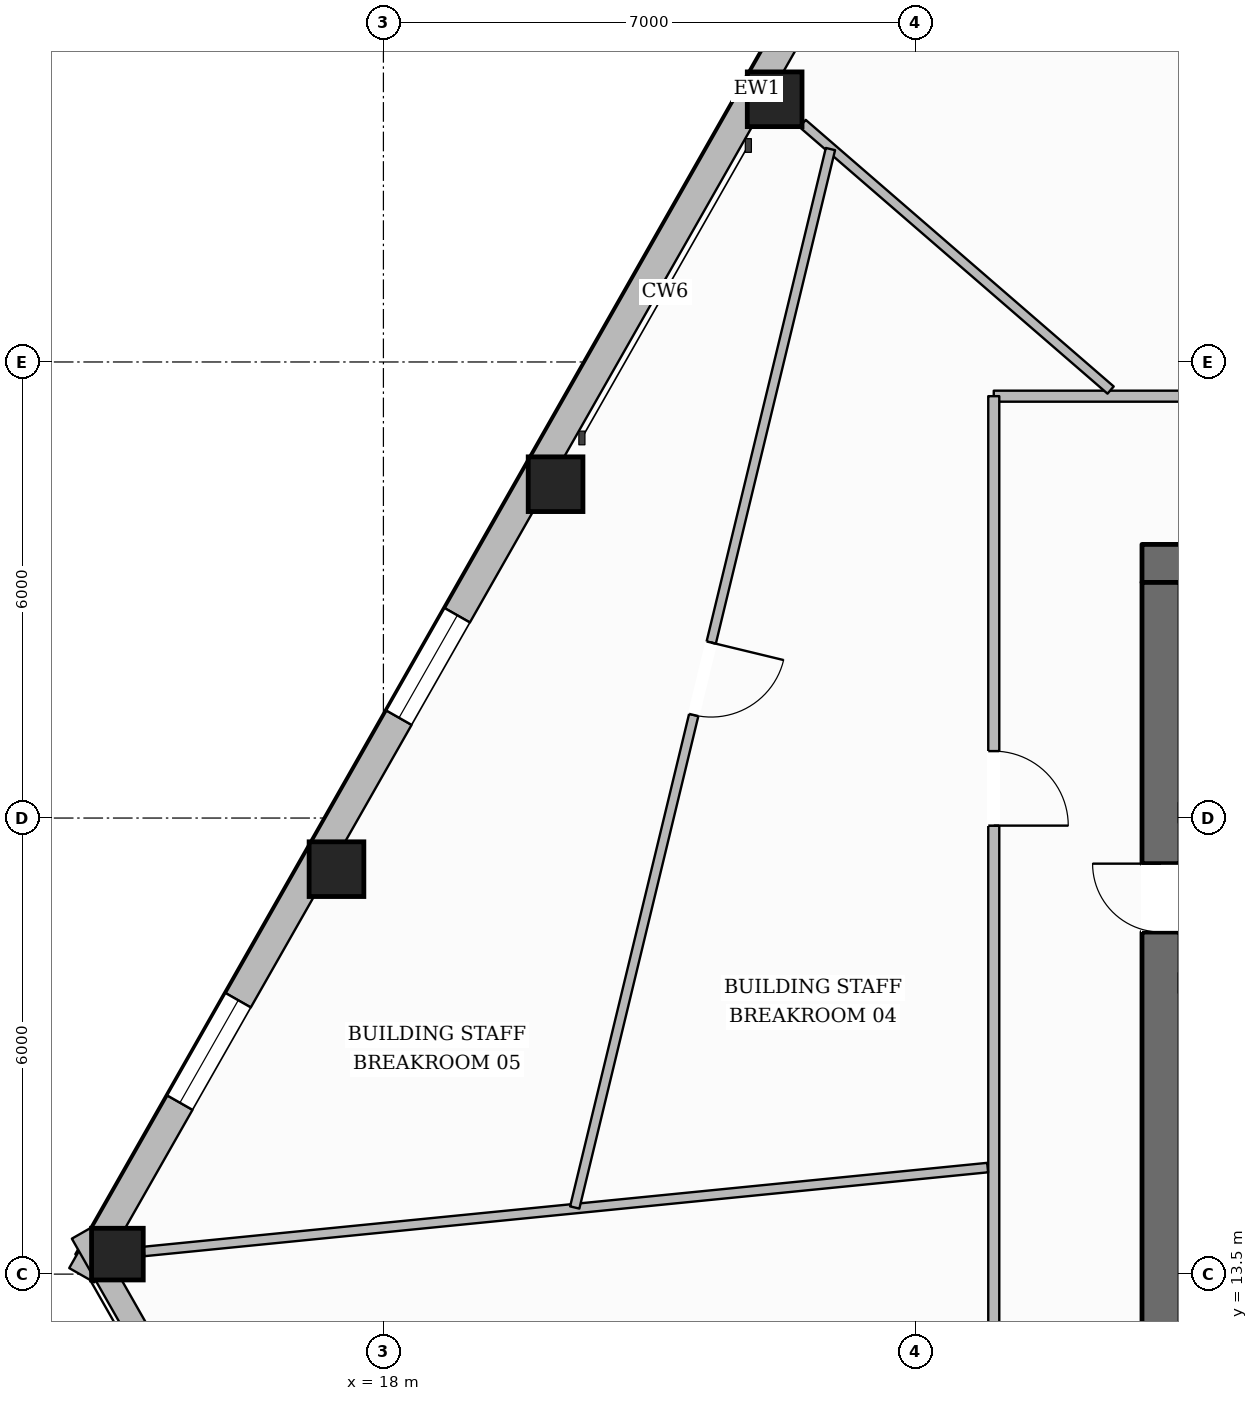
"""IFC4 building model, lengths in metres.
Left out: names, types, materials, properties, quantities, classifications, styles, units other than length and angle.
Written with IfcOpenShell. Run it as: python <this file> out.ifc"""

import sys

from ifc_helpers import new_model, si_unit, direction, frame, frame_2d, origin, origin_2d, place, context, subcontext, project, spatial, rectangle, hollow_rectangle, extrude, element, fill, save


model = new_model("IFC4")
c1 = context("Model", 3, precision=1e-05, world=origin(), true_north=direction((0.0, 1.0)))
c2 = subcontext(c1, "Body", "Model", "MODEL_VIEW")
j1 = project(units=[si_unit("LENGTHUNIT", "METRE"), si_unit("PLANEANGLEUNIT", "RADIAN")], contexts=[c1])
p1 = place(None, origin())
s1 = spatial("IfcSite", under=j1, at=p1, CompositionType="ELEMENT")
p2 = place(p1, origin())
s2 = spatial("IfcBuilding", under=s1, at=p2, CompositionType="ELEMENT")
p3 = place(p2, frame((0.0, 0.0, 93.2)))
s3 = spatial("IfcBuildingStorey", under=s2, at=p3, CompositionType="ELEMENT", Elevation=93.2)
p4 = place(p3, frame((27.98, 22.85, 0.0), z_axis=(0.0, 0.0, 1.0), x_axis=(1.0, 0.0, 0.0)))
e1 = element("IfcWall", 1, at=p4, inside=s3, PredefinedType="SOLIDWALL", context=c2, shape_type="SweptSolid", body=[
    extrude(rectangle(XDim=20.04, YDim=0.5, at=frame_2d((10.02, 0.0))), origin(), (0.0, 0.0, 1.0), 3.6),
])
p5 = place(p4, frame((6.295, 0.0, 0.0)))
e2 = element("IfcOpeningElement", 2, at=p5, cuts=e1, PredefinedType="OPENING", context=c2, shape_type="SweptSolid", body=[
    extrude(rectangle(XDim=1.05, YDim=2.15, at=frame_2d((0.525, 1.075))), frame((0.0, 0.26, 0.0), z_axis=(0.0, -1.0, 0.0), x_axis=(1.0, 0.0, 0.0)), (0.0, 0.0, 1.0), 0.52),
])
p6 = place(p4, frame((12.695, 0.0, 0.0)))
e3 = element("IfcOpeningElement", 3, at=p6, cuts=e1, PredefinedType="OPENING", context=c2, shape_type="SweptSolid", body=[
    extrude(rectangle(XDim=1.05, YDim=2.15, at=frame_2d((0.525, 1.075))), frame((0.0, 0.26, 0.0), z_axis=(0.0, -1.0, 0.0), x_axis=(1.0, 0.0, 0.0)), (0.0, 0.0, 1.0), 0.52),
])
p7 = place(p3, frame((28.23, 9.6, 0.0), z_axis=(0.0, 0.0, 1.0), x_axis=(0.0, 1.0, 0.0)))
e4 = element("IfcWall", 4, at=p7, inside=s3, PredefinedType="SOLIDWALL", context=c2, shape_type="SweptSolid", body=[
    extrude(rectangle(XDim=13.0, YDim=0.5, at=frame_2d((6.5, 0.0))), origin(), (0.0, 0.0, 1.0), 3.6),
])
p8 = place(p7, frame((0.2, 0.0, 0.0)))
e5 = element("IfcOpeningElement", 5, at=p8, cuts=e4, PredefinedType="OPENING", context=c2, shape_type="SweptSolid", body=[
    extrude(rectangle(XDim=1.1, YDim=2.15, at=frame_2d((0.55, 1.075))), frame((0.0, 0.26, 0.0), z_axis=(0.0, -1.0, 0.0), x_axis=(1.0, 0.0, 0.0)), (0.0, 0.0, 1.0), 0.52),
])
p9 = place(p7, frame((8.4, 0.0, 0.0)))
e6 = element("IfcOpeningElement", 6, at=p9, cuts=e4, PredefinedType="OPENING", context=c2, shape_type="SweptSolid", body=[
    extrude(rectangle(XDim=0.9, YDim=2.1, at=frame_2d((0.45, 1.05))), frame((0.0, 0.26, 0.0), z_axis=(0.0, -1.0, 0.0), x_axis=(1.0, 0.0, 0.0)), (0.0, 0.0, 1.0), 0.52),
])
for number, where, z_axis, x_axis in (
    (7, (23.147, 28.956, 0.0), (0.0, 0.0, 1.0), (1.0, 0.0, 0.0)),
    (8, (20.265, 23.892, 0.0), (0.0, 0.0, 1.0), (1.0, 0.0, 0.0)),
    (9, (17.383, 18.827, 0.0), (0.0, 0.0, 1.0), (1.0, 0.0, 0.0)),
):
    element("IfcColumn", number, at=place(p3, frame(where, z_axis=z_axis, x_axis=x_axis)), inside=s3, PredefinedType="COLUMN", context=c2, shape_type="SweptSolid", body=[
        extrude(hollow_rectangle(XDim=0.72, YDim=0.72, WallThickness=0.032, at=origin_2d()), origin(), (0.0, 0.0, 1.0), 3.6),
    ])
p10 = place(p3, frame((14.5, 13.763, 0.0), z_axis=(0.0, 0.0, 1.0), x_axis=(1.0, 0.0, 0.0)))
e10 = element("IfcColumn", 10, at=p10, inside=s3, PredefinedType="COLUMN", context=c2, shape_type="SweptSolid", body=[
    extrude(hollow_rectangle(XDim=0.68, YDim=0.68, WallThickness=0.03, at=origin_2d()), origin(), (0.0, 0.0, 1.0), 3.6),
])
p11 = place(p3, frame((14.031, 13.485, 0.0), z_axis=(0.0, 0.0, 1.0), x_axis=(0.494642620698, 0.869096472084, 0.0)))
e11 = element("IfcWall", 11, at=p11, inside=s3, PredefinedType="STANDARD", context=c2, shape_type="SweptSolid", body=[
    extrude(rectangle(XDim=35.916, YDim=0.38, at=frame_2d((17.958, 0.0))), origin(), (0.0, 0.0, 1.0), 3.059),
])
p12 = place(p11, frame((31.748, 0.0, 0.65)))
e12 = element("IfcOpeningElement", 12, at=p12, cuts=e11, PredefinedType="OPENING", context=c2, shape_type="SweptSolid", body=[
    extrude(rectangle(XDim=1.55, YDim=1.75, at=frame_2d((0.775, 0.875))), frame((0.0, 0.2, 0.0), z_axis=(0.0, -1.0, 0.0), x_axis=(1.0, 0.0, 0.0)), (0.0, 0.0, 1.0), 0.4),
])
p13 = place(p11, frame((25.921, 0.0, 0.65)))
e13 = element("IfcOpeningElement", 13, at=p13, cuts=e11, PredefinedType="OPENING", context=c2, shape_type="SweptSolid", body=[
    extrude(rectangle(XDim=1.55, YDim=1.75, at=frame_2d((0.775, 0.875))), frame((0.0, 0.2, 0.0), z_axis=(0.0, -1.0, 0.0), x_axis=(1.0, 0.0, 0.0)), (0.0, 0.0, 1.0), 0.4),
])
p14 = place(p11, frame((8.439, 0.0, 0.65)))
e14 = element("IfcOpeningElement", 14, at=p14, cuts=e11, PredefinedType="OPENING", context=c2, shape_type="SweptSolid", body=[
    extrude(rectangle(XDim=1.55, YDim=1.75, at=frame_2d((0.775, 0.875))), frame((0.0, 0.2, 0.0), z_axis=(0.0, -1.0, 0.0), x_axis=(1.0, 0.0, 0.0)), (0.0, 0.0, 1.0), 0.4),
])
p15 = place(p11, frame((2.612, 0.0, 0.65)))
e15 = element("IfcOpeningElement", 15, at=p15, cuts=e11, PredefinedType="OPENING", context=c2, shape_type="SweptSolid", body=[
    extrude(rectangle(XDim=1.55, YDim=1.75, at=frame_2d((0.775, 0.875))), frame((0.0, 0.2, 0.0), z_axis=(0.0, -1.0, 0.0), x_axis=(1.0, 0.0, 0.0)), (0.0, 0.0, 1.0), 0.4),
])
p16 = place(p3, frame((20.714, 2.3, 0.0), z_axis=(0.0, 0.0, 1.0), x_axis=(-0.494645467688, 0.869094851726, 0.0)))
e16 = element("IfcWall", 16, at=p16, inside=s3, PredefinedType="STANDARD", context=c2, shape_type="SweptSolid", body=[
    extrude(rectangle(XDim=13.51, YDim=0.3, at=frame_2d((6.755, 0.0))), origin(), (0.0, 0.0, 1.0), 3.059),
])
p17 = place(p16, frame((6.155, 0.0, 0.65)))
e17 = element("IfcOpeningElement", 17, at=p17, cuts=e16, PredefinedType="OPENING", context=c2, shape_type="SweptSolid", body=[
    extrude(rectangle(XDim=1.2, YDim=1.7, at=frame_2d((0.6, 0.85))), frame((0.0, 0.16, 0.0), z_axis=(0.0, -1.0, 0.0), x_axis=(1.0, 0.0, 0.0)), (0.0, 0.0, 1.0), 0.32),
])
p18 = place(p3, frame((49.97, 25.05, 0.0), z_axis=(0.0, 0.0, 1.0), x_axis=(-1.0, 0.0, 0.0)))
e18 = element("IfcWall", 18, at=p18, inside=s3, PredefinedType="PARTITIONING", context=c2, shape_type="SweptSolid", body=[
    extrude(rectangle(XDim=23.94, YDim=0.145, at=frame_2d((11.97, 0.0))), origin(), (0.0, 0.0, 1.0), 3.6),
])
p19 = place(p18, frame((14.53, 0.0, 0.0)))
e19 = element("IfcOpeningElement", 19, at=p19, cuts=e18, PredefinedType="OPENING", context=c2, shape_type="SweptSolid", body=[
    extrude(rectangle(XDim=0.88, YDim=2.1, at=frame_2d((0.44, 1.05))), frame((0.0, 0.083, 0.0), z_axis=(0.0, -1.0, 0.0), x_axis=(1.0, 0.0, 0.0)), (0.0, 0.0, 1.0), 0.165),
])
p20 = place(p18, frame((12.01, 0.0, 0.0)))
e20 = element("IfcOpeningElement", 20, at=p20, cuts=e18, PredefinedType="OPENING", context=c2, shape_type="SweptSolid", body=[
    extrude(rectangle(XDim=0.88, YDim=2.1, at=frame_2d((0.44, 1.05))), frame((0.0, 0.083, 0.0), z_axis=(0.0, -1.0, 0.0), x_axis=(1.0, 0.0, 0.0)), (0.0, 0.0, 1.0), 0.165),
])
p21 = place(p18, frame((9.55, 0.0, 0.0)))
e21 = element("IfcOpeningElement", 21, at=p21, cuts=e18, PredefinedType="OPENING", context=c2, shape_type="SweptSolid", body=[
    extrude(rectangle(XDim=0.96, YDim=2.1, at=frame_2d((0.48, 1.05))), frame((0.0, 0.083, 0.0), z_axis=(0.0, -1.0, 0.0), x_axis=(1.0, 0.0, 0.0)), (0.0, 0.0, 1.0), 0.165),
])
p22 = place(p18, frame((18.561, 0.0, 0.0)))
e22 = element("IfcOpeningElement", 22, at=p22, cuts=e18, PredefinedType="OPENING", context=c2, shape_type="SweptSolid", body=[
    extrude(rectangle(XDim=1.4, YDim=2.2, at=frame_2d((0.7, 1.1))), frame((0.0, 0.083, 0.0), z_axis=(0.0, -1.0, 0.0), x_axis=(1.0, 0.0, 0.0)), (0.0, 0.0, 1.0), 0.165),
])
p23 = place(p3, frame((26.03, 25.05, 0.0), z_axis=(0.0, 0.0, 1.0), x_axis=(0.0, -1.0, 0.0)))
e23 = element("IfcWall", 23, at=p23, inside=s3, PredefinedType="PARTITIONING", context=c2, shape_type="SweptSolid", body=[
    extrude(rectangle(XDim=17.9, YDim=0.145, at=frame_2d((8.95, 0.0))), origin(), (0.0, 0.0, 1.0), 3.288),
])
p24 = place(p23, frame((4.67, 0.0, 0.0)))
e24 = element("IfcOpeningElement", 24, at=p24, cuts=e23, PredefinedType="OPENING", context=c2, shape_type="SweptSolid", body=[
    extrude(rectangle(XDim=0.98, YDim=2.15, at=frame_2d((0.49, 1.075))), frame((0.0, 0.083, 0.0), z_axis=(0.0, -1.0, 0.0), x_axis=(1.0, 0.0, 0.0)), (0.0, 0.0, 1.0), 0.165),
])
p25 = place(p23, frame((12.799, 0.0, 0.0)))
e25 = element("IfcOpeningElement", 25, at=p25, cuts=e23, PredefinedType="OPENING", context=c2, shape_type="SweptSolid", body=[
    extrude(rectangle(XDim=1.4, YDim=2.2, at=frame_2d((0.7, 1.1))), frame((0.0, 0.083, 0.0), z_axis=(0.0, -1.0, 0.0), x_axis=(1.0, 0.0, 0.0)), (0.0, 0.0, 1.0), 0.165),
])
p26 = place(p3, frame((27.567, 25.131, 0.0), z_axis=(0.0, 0.0, 1.0), x_axis=(-0.756118826097, 0.654434351804, 0.0)))
e26 = element("IfcWall", 26, at=p26, inside=s3, PredefinedType="PARTITIONING", context=c2, shape_type="SweptSolid", body=[
    extrude(rectangle(XDim=5.359, YDim=0.125, at=frame_2d((2.679, 0.0))), origin(), (0.0, 0.0, 1.0), 3.141),
])
p27 = place(p3, frame((25.949, 14.902, 0.0), z_axis=(0.0, 0.0, 1.0), x_axis=(-0.995091212478, -0.0989620071, 0.0)))
e27 = element("IfcWall", 27, at=p27, inside=s3, PredefinedType="PARTITIONING", context=c2, shape_type="SweptSolid", body=[
    extrude(rectangle(XDim=11.156, YDim=0.125, at=frame_2d((5.578, 0.0))), origin(), (0.0, 0.0, 1.0), 3.141),
])
p28 = place(p3, frame((23.881, 28.301, 0.0), z_axis=(0.0, 0.0, 1.0), x_axis=(-0.234828781447, -0.972036750027, 0.0)))
e28 = element("IfcWall", 28, at=p28, inside=s3, PredefinedType="PARTITIONING", context=c2, shape_type="SweptSolid", body=[
    extrude(rectangle(XDim=14.325, YDim=0.125, at=frame_2d((7.163, 0.0))), origin(), (0.0, 0.0, 1.0), 3.288),
])
p29 = place(p28, frame((6.679, 0.0, 0.0)))
e29 = element("IfcOpeningElement", 29, at=p29, cuts=e28, PredefinedType="OPENING", context=c2, shape_type="SweptSolid", body=[
    extrude(rectangle(XDim=0.98, YDim=2.15, at=frame_2d((0.49, 1.075))), frame((0.0, 0.073, 0.0), z_axis=(0.0, -1.0, 0.0), x_axis=(1.0, 0.0, 0.0)), (0.0, 0.0, 1.0), 0.145),
])
p30 = place(p14, origin())
e30 = element("IfcWindow", 30, at=p30, inside=s3, PartitioningType="SINGLE_PANEL", PredefinedType="WINDOW", context=c2, shape_type="SweptSolid", body=[
    extrude(rectangle(XDim=1.55, YDim=1.75, at=frame_2d((0.775, 0.875))), frame((0.0, 0.03, 0.0), z_axis=(0.0, -1.0, 0.0), x_axis=(1.0, 0.0, 0.0)), (0.0, 0.0, 1.0), 0.06),
])
fill(e14, e30)
p31 = place(p15, origin())
e31 = element("IfcWindow", 31, at=p31, inside=s3, PartitioningType="SINGLE_PANEL", PredefinedType="WINDOW", context=c2, shape_type="SweptSolid", body=[
    extrude(rectangle(XDim=1.55, YDim=1.75, at=frame_2d((0.775, 0.875))), frame((0.0, 0.03, 0.0), z_axis=(0.0, -1.0, 0.0), x_axis=(1.0, 0.0, 0.0)), (0.0, 0.0, 1.0), 0.06),
])
fill(e15, e31)
p32 = place(p9, origin())
e32 = element("IfcDoor", 32, at=p32, inside=s3, OperationType="SINGLE_SWING_RIGHT", PredefinedType="DOOR", context=c2, shape_type="SweptSolid", body=[
    extrude(rectangle(XDim=0.9, YDim=2.1, at=frame_2d((0.45, 1.05))), frame((0.0, 0.025, 0.0), z_axis=(0.0, -1.0, 0.0), x_axis=(1.0, 0.0, 0.0)), (0.0, 0.0, 1.0), 0.05),
])
fill(e6, e32)
p33 = place(p24, origin())
e33 = element("IfcDoor", 33, at=p33, inside=s3, OperationType="SINGLE_SWING_RIGHT", PredefinedType="DOOR", context=c2, shape_type="SweptSolid", body=[
    extrude(rectangle(XDim=0.98, YDim=2.15, at=frame_2d((0.49, 1.075))), frame((0.0, 0.025, 0.0), z_axis=(0.0, -1.0, 0.0), x_axis=(1.0, 0.0, 0.0)), (0.0, 0.0, 1.0), 0.05),
])
fill(e24, e33)
p34 = place(p29, origin())
e34 = element("IfcDoor", 34, at=p34, inside=s3, OperationType="SINGLE_SWING_LEFT", PredefinedType="DOOR", context=c2, shape_type="SweptSolid", body=[
    extrude(rectangle(XDim=0.98, YDim=2.15, at=frame_2d((0.49, 1.075))), frame((0.0, 0.025, 0.0), z_axis=(0.0, -1.0, 0.0), x_axis=(1.0, 0.0, 0.0)), (0.0, 0.0, 1.0), 0.05),
])
fill(e29, e34)
save(model, sys.argv[1])
